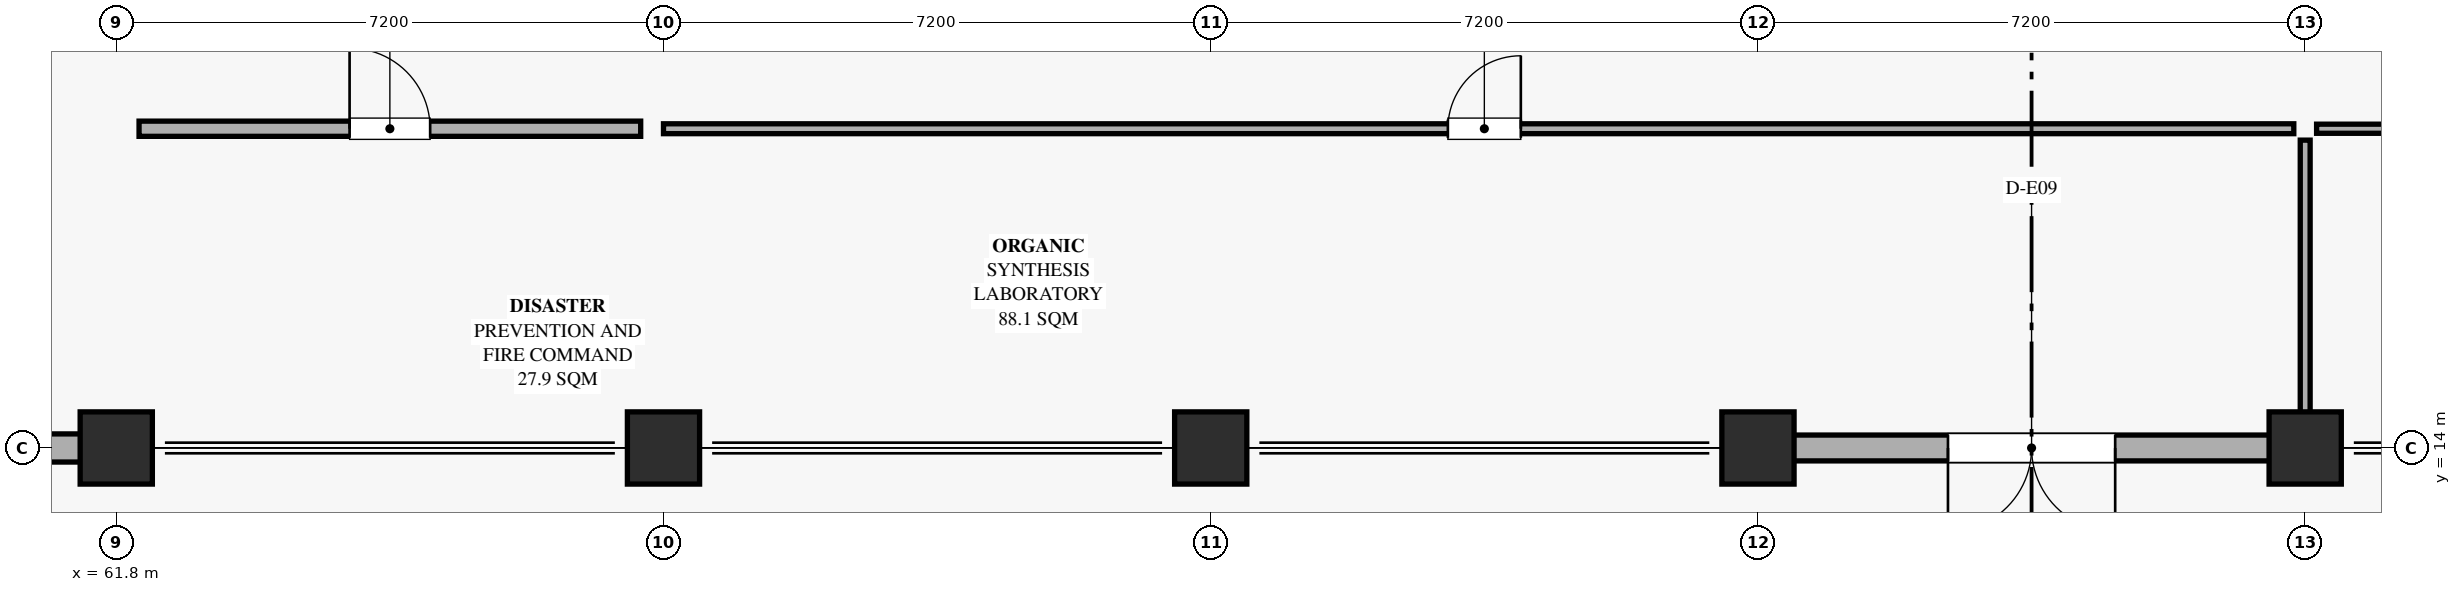
"""IFC4 building model, lengths in metres.
Left out: names, types, materials, properties, quantities, classifications, styles, units other than length and angle.
Written with IfcOpenShell. Run it as: python <this file> out.ifc"""

import sys

from ifc_helpers import new_model, si_unit, direction, frame, frame_2d, origin, origin_2d, place, context, subcontext, project, spatial, rectangle, extrude, element, fill, save


model = new_model("IFC4")
c1 = context("Model", 3, precision=1e-05, world=origin(), true_north=direction((0.0, 1.0)))
c2 = subcontext(c1, "Body", "Model", "MODEL_VIEW")
j1 = project(units=[si_unit("LENGTHUNIT", "METRE"), si_unit("PLANEANGLEUNIT", "RADIAN")], contexts=[c1])
p1 = place(None, origin())
s1 = spatial("IfcSite", under=j1, at=p1, CompositionType="ELEMENT")
p2 = place(p1, origin())
s2 = spatial("IfcBuilding", under=s1, at=p2, CompositionType="ELEMENT")
p3 = place(p2, origin())
s3 = spatial("IfcBuildingStorey", under=s2, at=p3, CompositionType="ELEMENT", Elevation=0.0)
for number, where, z_axis, x_axis in (
    (1, (61.8, 14.0, 0.0), (0.0, 0.0, 1.0), (1.0, 0.0, 0.0)),
    (2, (69.0, 14.0, 0.0), (0.0, 0.0, 1.0), (1.0, 0.0, 0.0)),
    (3, (76.2, 14.0, 0.0), (0.0, 0.0, 1.0), (1.0, 0.0, 0.0)),
    (4, (83.4, 14.0, 0.0), (0.0, 0.0, 1.0), (1.0, 0.0, 0.0)),
    (5, (90.6, 14.0, 0.0), (0.0, 0.0, 1.0), (1.0, 0.0, 0.0)),
):
    element("IfcColumn", number, at=place(p3, frame(where, z_axis=z_axis, x_axis=x_axis)), inside=s3, PredefinedType="COLUMN", context=c2, shape_type="SweptSolid", body=[
        extrude(rectangle(XDim=0.95, YDim=0.95, at=origin_2d()), origin(), (0.0, 0.0, 1.0), 5.4),
    ])
p4 = place(p3, frame((90.14, 14.0, 0.0), z_axis=(0.0, 0.0, 1.0), x_axis=(-1.0, 0.0, 0.0)))
e6 = element("IfcWall", 6, at=p4, inside=s3, PredefinedType="SOLIDWALL", context=c2, shape_type="SweptSolid", body=[
    extrude(rectangle(XDim=6.28, YDim=0.34, at=frame_2d((3.14, 0.0))), origin(), (0.0, 0.0, 1.0), 3.9),
])
p5 = place(p4, frame((2.04, 0.0, 0.0)))
e7 = element("IfcOpeningElement", 7, at=p5, cuts=e6, PredefinedType="OPENING", context=c2, shape_type="SweptSolid", body=[
    extrude(rectangle(XDim=2.2, YDim=2.4, at=frame_2d((1.1, 1.2))), frame((0.0, 0.18, 0.0), z_axis=(0.0, -1.0, 0.0), x_axis=(1.0, 0.0, 0.0)), (0.0, 0.0, 1.0), 0.36),
])
p6 = place(p3, frame((61.34, 14.0, 0.0), z_axis=(0.0, 0.0, 1.0), x_axis=(-1.0, 0.0, 0.0)))
e8 = element("IfcWall", 8, at=p6, inside=s3, PredefinedType="SOLIDWALL", context=c2, shape_type="SweptSolid", body=[
    extrude(rectangle(XDim=6.28, YDim=0.37, at=frame_2d((3.14, 0.0))), origin(), (0.0, 0.0, 1.0), 3.9),
])
p7 = place(p6, frame((1.94, 0.0, 0.0)))
e9 = element("IfcOpeningElement", 9, at=p7, cuts=e8, PredefinedType="OPENING", context=c2, shape_type="SweptSolid", body=[
    extrude(rectangle(XDim=2.4, YDim=2.4, at=frame_2d((1.2, 1.2))), frame((0.0, 0.195, 0.0), z_axis=(0.0, -1.0, 0.0), x_axis=(1.0, 0.0, 0.0)), (0.0, 0.0, 1.0), 0.39),
])
p8 = place(p3, frame((62.1, 18.2, 0.0), z_axis=(0.0, 0.0, 1.0), x_axis=(1.0, 0.0, 0.0)))
e10 = element("IfcWall", 10, at=p8, inside=s3, PredefinedType="PARTITIONING", context=c2, shape_type="SweptSolid", body=[
    extrude(rectangle(XDim=6.6, YDim=0.2, at=frame_2d((3.3, 0.0))), origin(), (0.0, 0.0, 1.0), 3.88),
])
p9 = place(p8, frame((2.77, 0.0, 0.0)))
e11 = element("IfcOpeningElement", 11, at=p9, cuts=e10, PredefinedType="OPENING", context=c2, shape_type="SweptSolid", body=[
    extrude(rectangle(XDim=1.06, YDim=2.06, at=frame_2d((0.53, 1.03))), frame((0.0, 0.11, 0.0), z_axis=(0.0, -1.0, 0.0), x_axis=(1.0, 0.0, 0.0)), (0.0, 0.0, 1.0), 0.22),
])
p10 = place(p3, frame((69.0, 18.2, 0.0), z_axis=(0.0, 0.0, 1.0), x_axis=(1.0, 0.0, 0.0)))
e12 = element("IfcWall", 12, at=p10, inside=s3, PredefinedType="PARTITIONING", context=c2, shape_type="SweptSolid", body=[
    extrude(rectangle(XDim=21.45, YDim=0.13, at=frame_2d((10.725, 0.0))), origin(), (0.0, 0.0, 1.0), 3.88),
])
p11 = place(p10, frame((10.32, 0.0, 0.0)))
e13 = element("IfcOpeningElement", 13, at=p11, cuts=e12, PredefinedType="OPENING", context=c2, shape_type="SweptSolid", body=[
    extrude(rectangle(XDim=0.96, YDim=2.1, at=frame_2d((0.48, 1.05))), frame((0.0, 0.075, 0.0), z_axis=(0.0, -1.0, 0.0), x_axis=(1.0, 0.0, 0.0)), (0.0, 0.0, 1.0), 0.15),
])
p12 = place(p3, frame((90.6, 18.05, 0.0), z_axis=(0.0, 0.0, 1.0), x_axis=(0.0, -1.0, 0.0)))
e14 = element("IfcWall", 14, at=p12, inside=s3, PredefinedType="PARTITIONING", context=c2, shape_type="SweptSolid", body=[
    extrude(rectangle(XDim=3.75, YDim=0.13, at=frame_2d((1.875, 0.0))), origin(), (0.0, 0.0, 1.0), 3.88),
])
p13 = place(p3, frame((90.75, 18.2, 0.0), z_axis=(0.0, 0.0, 1.0), x_axis=(1.0, 0.0, 0.0)))
e15 = element("IfcWall", 15, at=p13, inside=s3, PredefinedType="PARTITIONING", context=c2, shape_type="SweptSolid", body=[
    extrude(rectangle(XDim=28.3, YDim=0.12, at=frame_2d((14.15, 0.0))), origin(), (0.0, 0.0, 1.0), 3.88),
])
p14 = place(p13, frame((10.17, 0.0, 0.0)))
e16 = element("IfcOpeningElement", 16, at=p14, cuts=e15, PredefinedType="OPENING", context=c2, shape_type="SweptSolid", body=[
    extrude(rectangle(XDim=0.96, YDim=2.16, at=frame_2d((0.48, 1.08))), frame((0.0, 0.07, 0.0), z_axis=(0.0, -1.0, 0.0), x_axis=(1.0, 0.0, 0.0)), (0.0, 0.0, 1.0), 0.14),
])
p15 = place(p5, origin())
e17 = element("IfcDoor", 17, at=p15, inside=s3, OperationType="DOUBLE_DOOR_SINGLE_SWING", PredefinedType="DOOR", context=c2, shape_type="SweptSolid", body=[
    extrude(rectangle(XDim=2.2, YDim=2.4, at=frame_2d((1.1, 1.2))), frame((0.0, 0.025, 0.0), z_axis=(0.0, -1.0, 0.0), x_axis=(1.0, 0.0, 0.0)), (0.0, 0.0, 1.0), 0.05),
])
fill(e7, e17)
p16 = place(p9, origin())
e18 = element("IfcDoor", 18, at=p16, inside=s3, OperationType="SINGLE_SWING_LEFT", PredefinedType="DOOR", context=c2, shape_type="SweptSolid", body=[
    extrude(rectangle(XDim=1.06, YDim=2.06, at=frame_2d((0.53, 1.03))), frame((0.0, 0.025, 0.0), z_axis=(0.0, -1.0, 0.0), x_axis=(1.0, 0.0, 0.0)), (0.0, 0.0, 1.0), 0.05),
])
fill(e11, e18)
p17 = place(p11, origin())
e19 = element("IfcDoor", 19, at=p17, inside=s3, OperationType="SINGLE_SWING_RIGHT", PredefinedType="DOOR", context=c2, shape_type="SweptSolid", body=[
    extrude(rectangle(XDim=0.96, YDim=2.1, at=frame_2d((0.48, 1.05))), frame((0.0, 0.025, 0.0), z_axis=(0.0, -1.0, 0.0), x_axis=(1.0, 0.0, 0.0)), (0.0, 0.0, 1.0), 0.05),
])
fill(e13, e19)
save(model, sys.argv[1])
